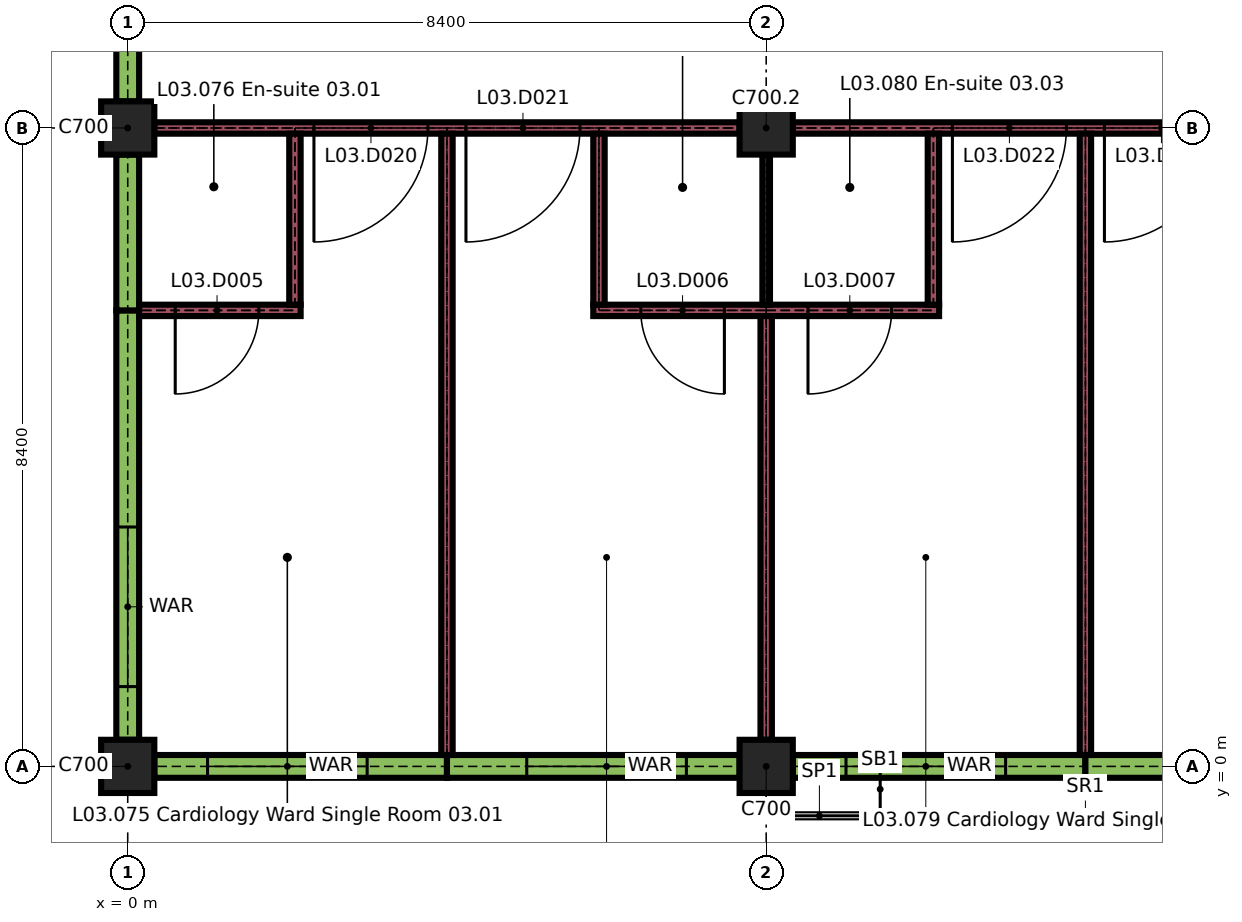
"""IFC4 building model, lengths in metres.
Left out: names, types, materials, properties, quantities, classifications, styles, units other than length and angle.
Written with IfcOpenShell. Run it as: python <this file> out.ifc"""

import sys

from ifc_helpers import new_model, si_unit, direction, frame, frame_2d, origin, origin_2d, place, context, subcontext, project, spatial, rectangle, extrude, element, fill, save


model = new_model("IFC4")
c1 = context("Model", 3, precision=1e-05, world=origin(), true_north=direction((0.0, 1.0)))
c2 = subcontext(c1, "Body", "Model", "MODEL_VIEW")
j1 = project(units=[si_unit("LENGTHUNIT", "METRE"), si_unit("PLANEANGLEUNIT", "RADIAN")], contexts=[c1])
p1 = place(None, origin())
s1 = spatial("IfcSite", under=j1, at=p1, CompositionType="ELEMENT")
p2 = place(p1, origin())
s2 = spatial("IfcBuilding", under=s1, at=p2, CompositionType="ELEMENT")
p3 = place(p2, frame((0.0, 0.0, 15.3)))
s3 = spatial("IfcBuildingStorey", under=s2, at=p3, CompositionType="ELEMENT", Elevation=15.3)
for number, where, z_axis, x_axis in (
    (1, (0.0, 0.0, 0.0), (0.0, 0.0, 1.0), (1.0, 0.0, 0.0)),
    (2, (8.4, 0.0, 0.0), (0.0, 0.0, 1.0), (1.0, 0.0, 0.0)),
    (3, (0.0, 8.4, 0.0), (0.0, 0.0, 1.0), (1.0, 0.0, 0.0)),
    (4, (8.4, 8.4, 0.0), (0.0, 0.0, 1.0), (1.0, 0.0, 0.0)),
):
    element("IfcColumn", number, at=place(p3, frame(where, z_axis=z_axis, x_axis=x_axis)), inside=s3, PredefinedType="COLUMN", context=c2, shape_type="SweptSolid", body=[
        extrude(rectangle(XDim=0.7, YDim=0.7, at=origin_2d()), origin(), (0.0, 0.0, 1.0), 3.26),
    ])
p4 = place(p3, frame((0.35, 0.0, 0.0), z_axis=(0.0, 0.0, 1.0), x_axis=(1.0, 0.0, 0.0)))
e5 = element("IfcWall", 5, at=p4, inside=s3, PredefinedType="SOLIDWALL", context=c2, shape_type="SweptSolid", body=[
    extrude(rectangle(XDim=3.85, YDim=0.3, at=frame_2d((1.925, 0.0))), origin(), (0.0, 0.0, 1.0), 2.96),
])
p5 = place(p4, frame((0.7, 0.0, 0.9)))
e6 = element("IfcOpeningElement", 6, at=p5, cuts=e5, PredefinedType="OPENING", context=c2, shape_type="SweptSolid", body=[
    extrude(rectangle(XDim=2.1, YDim=1.5, at=frame_2d((1.05, 0.75))), frame((0.0, 0.16, 0.0), z_axis=(0.0, -1.0, 0.0), x_axis=(1.0, 0.0, 0.0)), (0.0, 0.0, 1.0), 0.32),
])
p6 = place(p3, frame((4.2, 0.0, 0.0), z_axis=(0.0, 0.0, 1.0), x_axis=(1.0, 0.0, 0.0)))
e7 = element("IfcWall", 7, at=p6, inside=s3, PredefinedType="SOLIDWALL", context=c2, shape_type="SweptSolid", body=[
    extrude(rectangle(XDim=3.85, YDim=0.3, at=frame_2d((1.925, 0.0))), origin(), (0.0, 0.0, 1.0), 2.96),
])
p7 = place(p6, frame((1.05, 0.0, 0.9)))
e8 = element("IfcOpeningElement", 8, at=p7, cuts=e7, PredefinedType="OPENING", context=c2, shape_type="SweptSolid", body=[
    extrude(rectangle(XDim=2.1, YDim=1.5, at=frame_2d((1.05, 0.75))), frame((0.0, 0.16, 0.0), z_axis=(0.0, -1.0, 0.0), x_axis=(1.0, 0.0, 0.0)), (0.0, 0.0, 1.0), 0.32),
])
p8 = place(p3, frame((8.75, 0.0, 0.0), z_axis=(0.0, 0.0, 1.0), x_axis=(1.0, 0.0, 0.0)))
e9 = element("IfcWall", 9, at=p8, inside=s3, PredefinedType="SOLIDWALL", context=c2, shape_type="SweptSolid", body=[
    extrude(rectangle(XDim=3.85, YDim=0.3, at=frame_2d((1.925, 0.0))), origin(), (0.0, 0.0, 1.0), 2.96),
])
p9 = place(p8, frame((0.7, 0.0, 0.9)))
e10 = element("IfcOpeningElement", 10, at=p9, cuts=e9, PredefinedType="OPENING", context=c2, shape_type="SweptSolid", body=[
    extrude(rectangle(XDim=2.1, YDim=1.5, at=frame_2d((1.05, 0.75))), frame((0.0, 0.16, 0.0), z_axis=(0.0, -1.0, 0.0), x_axis=(1.0, 0.0, 0.0)), (0.0, 0.0, 1.0), 0.32),
])
p10 = place(p3, frame((12.6, 0.0, 0.0), z_axis=(0.0, 0.0, 1.0), x_axis=(1.0, 0.0, 0.0)))
e11 = element("IfcWall", 11, at=p10, inside=s3, PredefinedType="SOLIDWALL", context=c2, shape_type="SweptSolid", body=[
    extrude(rectangle(XDim=3.85, YDim=0.3, at=frame_2d((1.925, 0.0))), origin(), (0.0, 0.0, 1.0), 2.96),
])
p11 = place(p10, frame((1.05, 0.0, 0.9)))
e12 = element("IfcOpeningElement", 12, at=p11, cuts=e11, PredefinedType="OPENING", context=c2, shape_type="SweptSolid", body=[
    extrude(rectangle(XDim=2.1, YDim=1.5, at=frame_2d((1.05, 0.75))), frame((0.0, 0.16, 0.0), z_axis=(0.0, -1.0, 0.0), x_axis=(1.0, 0.0, 0.0)), (0.0, 0.0, 1.0), 0.32),
])
p12 = place(p3, frame((0.0, 0.35, 0.0), z_axis=(0.0, 0.0, 1.0), x_axis=(0.0, 1.0, 0.0)))
e13 = element("IfcWall", 13, at=p12, inside=s3, PredefinedType="SOLIDWALL", context=c2, shape_type="SweptSolid", body=[
    extrude(rectangle(XDim=5.65, YDim=0.3, at=frame_2d((2.825, 0.0))), origin(), (0.0, 0.0, 1.0), 2.96),
])
p13 = place(p12, frame((0.7, 0.0, 0.9)))
e14 = element("IfcOpeningElement", 14, at=p13, cuts=e13, PredefinedType="OPENING", context=c2, shape_type="SweptSolid", body=[
    extrude(rectangle(XDim=2.1, YDim=1.5, at=frame_2d((1.05, 0.75))), frame((0.0, 0.16, 0.0), z_axis=(0.0, -1.0, 0.0), x_axis=(1.0, 0.0, 0.0)), (0.0, 0.0, 1.0), 0.32),
])
p14 = place(p3, frame((0.0, 6.0, 0.0), z_axis=(0.0, 0.0, 1.0), x_axis=(0.0, 1.0, 0.0)))
e15 = element("IfcWall", 15, at=p14, inside=s3, PredefinedType="SOLIDWALL", context=c2, shape_type="SweptSolid", body=[
    extrude(rectangle(XDim=2.05, YDim=0.3, at=frame_2d((1.025, 0.0))), origin(), (0.0, 0.0, 1.0), 2.96),
])
p15 = place(p3, frame((0.0, 8.75, 0.0), z_axis=(0.0, 0.0, 1.0), x_axis=(0.0, 1.0, 0.0)))
e16 = element("IfcWall", 16, at=p15, inside=s3, PredefinedType="SOLIDWALL", context=c2, shape_type="SweptSolid", body=[
    extrude(rectangle(XDim=2.65, YDim=0.3, at=frame_2d((1.325, 0.0))), origin(), (0.0, 0.0, 1.0), 2.96),
])
p16 = place(p15, frame((1.3, 0.0, 0.9)))
e17 = element("IfcOpeningElement", 17, at=p16, cuts=e16, PredefinedType="OPENING", context=c2, shape_type="SweptSolid", body=[
    extrude(rectangle(XDim=0.9, YDim=1.5, at=frame_2d((0.45, 0.75))), frame((0.0, 0.16, 0.0), z_axis=(0.0, -1.0, 0.0), x_axis=(1.0, 0.0, 0.0)), (0.0, 0.0, 1.0), 0.32),
])
p17 = place(p3, frame((0.15, 6.0, 0.0), z_axis=(0.0, 0.0, 1.0), x_axis=(1.0, 0.0, 0.0)))
e18 = element("IfcWall", 18, at=p17, inside=s3, PredefinedType="PARTITIONING", context=c2, shape_type="SweptSolid", body=[
    extrude(rectangle(XDim=2.125, YDim=0.15, at=frame_2d((1.062, 0.0))), origin(), (0.0, 0.0, 1.0), 3.26),
])
p18 = place(p17, frame((0.475, 0.0, 0.0)))
e19 = element("IfcOpeningElement", 19, at=p18, cuts=e18, PredefinedType="OPENING", context=c2, shape_type="SweptSolid", body=[
    extrude(rectangle(XDim=1.1, YDim=2.1, at=frame_2d((0.55, 1.05))), frame((0.0, 0.085, 0.0), z_axis=(0.0, -1.0, 0.0), x_axis=(1.0, 0.0, 0.0)), (0.0, 0.0, 1.0), 0.17),
])
p19 = place(p3, frame((6.125, 6.0, 0.0), z_axis=(0.0, 0.0, 1.0), x_axis=(1.0, 0.0, 0.0)))
e20 = element("IfcWall", 20, at=p19, inside=s3, PredefinedType="PARTITIONING", context=c2, shape_type="SweptSolid", body=[
    extrude(rectangle(XDim=4.55, YDim=0.15, at=frame_2d((2.275, 0.0))), origin(), (0.0, 0.0, 1.0), 3.26),
])
p20 = place(p19, frame((0.625, 0.0, 0.0)))
e21 = element("IfcOpeningElement", 21, at=p20, cuts=e20, PredefinedType="OPENING", context=c2, shape_type="SweptSolid", body=[
    extrude(rectangle(XDim=1.1, YDim=2.1, at=frame_2d((0.55, 1.05))), frame((0.0, 0.085, 0.0), z_axis=(0.0, -1.0, 0.0), x_axis=(1.0, 0.0, 0.0)), (0.0, 0.0, 1.0), 0.17),
])
p21 = place(p19, frame((2.825, 0.0, 0.0)))
e22 = element("IfcOpeningElement", 22, at=p21, cuts=e20, PredefinedType="OPENING", context=c2, shape_type="SweptSolid", body=[
    extrude(rectangle(XDim=1.1, YDim=2.1, at=frame_2d((0.55, 1.05))), frame((0.0, 0.085, 0.0), z_axis=(0.0, -1.0, 0.0), x_axis=(1.0, 0.0, 0.0)), (0.0, 0.0, 1.0), 0.17),
])
p22 = place(p3, frame((0.35, 8.4, 0.0), z_axis=(0.0, 0.0, 1.0), x_axis=(1.0, 0.0, 0.0)))
e23 = element("IfcWall", 23, at=p22, inside=s3, PredefinedType="PARTITIONING", context=c2, shape_type="SweptSolid", body=[
    extrude(rectangle(XDim=7.7, YDim=0.15, at=frame_2d((3.85, 0.0))), origin(), (0.0, 0.0, 1.0), 3.26),
])
p23 = place(p22, frame((2.1, 0.0, 0.0)))
e24 = element("IfcOpeningElement", 24, at=p23, cuts=e23, PredefinedType="OPENING", context=c2, shape_type="SweptSolid", body=[
    extrude(rectangle(XDim=1.5, YDim=2.4, at=frame_2d((0.75, 1.2))), frame((0.0, 0.085, 0.0), z_axis=(0.0, -1.0, 0.0), x_axis=(1.0, 0.0, 0.0)), (0.0, 0.0, 1.0), 0.17),
])
p24 = place(p22, frame((4.1, 0.0, 0.0)))
e25 = element("IfcOpeningElement", 25, at=p24, cuts=e23, PredefinedType="OPENING", context=c2, shape_type="SweptSolid", body=[
    extrude(rectangle(XDim=1.5, YDim=2.4, at=frame_2d((0.75, 1.2))), frame((0.0, 0.085, 0.0), z_axis=(0.0, -1.0, 0.0), x_axis=(1.0, 0.0, 0.0)), (0.0, 0.0, 1.0), 0.17),
])
p25 = place(p3, frame((8.75, 8.4, 0.0), z_axis=(0.0, 0.0, 1.0), x_axis=(1.0, 0.0, 0.0)))
e26 = element("IfcWall", 26, at=p25, inside=s3, PredefinedType="PARTITIONING", context=c2, shape_type="SweptSolid", body=[
    extrude(rectangle(XDim=7.7, YDim=0.15, at=frame_2d((3.85, 0.0))), origin(), (0.0, 0.0, 1.0), 3.26),
])
p26 = place(p25, frame((2.1, 0.0, 0.0)))
e27 = element("IfcOpeningElement", 27, at=p26, cuts=e26, PredefinedType="OPENING", context=c2, shape_type="SweptSolid", body=[
    extrude(rectangle(XDim=1.5, YDim=2.4, at=frame_2d((0.75, 1.2))), frame((0.0, 0.085, 0.0), z_axis=(0.0, -1.0, 0.0), x_axis=(1.0, 0.0, 0.0)), (0.0, 0.0, 1.0), 0.17),
])
p27 = place(p25, frame((4.1, 0.0, 0.0)))
e28 = element("IfcOpeningElement", 28, at=p27, cuts=e26, PredefinedType="OPENING", context=c2, shape_type="SweptSolid", body=[
    extrude(rectangle(XDim=1.5, YDim=2.4, at=frame_2d((0.75, 1.2))), frame((0.0, 0.085, 0.0), z_axis=(0.0, -1.0, 0.0), x_axis=(1.0, 0.0, 0.0)), (0.0, 0.0, 1.0), 0.17),
])
p28 = place(p3, frame((2.2, 6.075, 0.0), z_axis=(0.0, 0.0, 1.0), x_axis=(0.0, 1.0, 0.0)))
e29 = element("IfcWall", 29, at=p28, inside=s3, PredefinedType="PARTITIONING", context=c2, shape_type="SweptSolid", body=[
    extrude(rectangle(XDim=2.25, YDim=0.15, at=frame_2d((1.125, 0.0))), origin(), (0.0, 0.0, 1.0), 3.26),
])
p29 = place(p3, frame((4.2, 0.15, 0.0), z_axis=(0.0, 0.0, 1.0), x_axis=(0.0, 1.0, 0.0)))
e30 = element("IfcWall", 30, at=p29, inside=s3, PredefinedType="PARTITIONING", context=c2, shape_type="SweptSolid", body=[
    extrude(rectangle(XDim=8.175, YDim=0.15, at=frame_2d((4.087, 0.0))), origin(), (0.0, 0.0, 1.0), 3.26),
])
p30 = place(p3, frame((6.2, 6.075, 0.0), z_axis=(0.0, 0.0, 1.0), x_axis=(0.0, 1.0, 0.0)))
e31 = element("IfcWall", 31, at=p30, inside=s3, PredefinedType="PARTITIONING", context=c2, shape_type="SweptSolid", body=[
    extrude(rectangle(XDim=2.25, YDim=0.15, at=frame_2d((1.125, 0.0))), origin(), (0.0, 0.0, 1.0), 3.26),
])
p31 = place(p3, frame((8.4, 0.35, 0.0), z_axis=(0.0, 0.0, 1.0), x_axis=(0.0, 1.0, 0.0)))
e32 = element("IfcWall", 32, at=p31, inside=s3, PredefinedType="PARTITIONING", context=c2, shape_type="SweptSolid", body=[
    extrude(rectangle(XDim=5.575, YDim=0.15, at=frame_2d((2.788, 0.0))), origin(), (0.0, 0.0, 1.0), 3.26),
])
p32 = place(p3, frame((8.4, 6.075, 0.0), z_axis=(0.0, 0.0, 1.0), x_axis=(0.0, 1.0, 0.0)))
e33 = element("IfcWall", 33, at=p32, inside=s3, PredefinedType="PARTITIONING", context=c2, shape_type="SweptSolid", body=[
    extrude(rectangle(XDim=1.975, YDim=0.1, at=frame_2d((0.988, 0.0))), origin(), (0.0, 0.0, 1.0), 3.26),
])
p33 = place(p3, frame((10.6, 6.075, 0.0), z_axis=(0.0, 0.0, 1.0), x_axis=(0.0, 1.0, 0.0)))
e34 = element("IfcWall", 34, at=p33, inside=s3, PredefinedType="PARTITIONING", context=c2, shape_type="SweptSolid", body=[
    extrude(rectangle(XDim=2.25, YDim=0.15, at=frame_2d((1.125, 0.0))), origin(), (0.0, 0.0, 1.0), 3.26),
])
p34 = place(p3, frame((12.6, 0.15, 0.0), z_axis=(0.0, 0.0, 1.0), x_axis=(0.0, 1.0, 0.0)))
e35 = element("IfcWall", 35, at=p34, inside=s3, PredefinedType="PARTITIONING", context=c2, shape_type="SweptSolid", body=[
    extrude(rectangle(XDim=8.175, YDim=0.15, at=frame_2d((4.087, 0.0))), origin(), (0.0, 0.0, 1.0), 3.26),
])
p35 = place(p5, origin())
e36 = element("IfcWindow", 36, at=p35, inside=s3, PartitioningType="DOUBLE_PANEL_VERTICAL", PredefinedType="WINDOW", context=c2, shape_type="SweptSolid", body=[
    extrude(rectangle(XDim=2.1, YDim=1.5, at=frame_2d((1.05, 0.75))), frame((0.0, 0.05, 0.0), z_axis=(0.0, -1.0, 0.0), x_axis=(1.0, 0.0, 0.0)), (0.0, 0.0, 1.0), 0.1),
])
fill(e6, e36)
p36 = place(p7, origin())
e37 = element("IfcWindow", 37, at=p36, inside=s3, PartitioningType="DOUBLE_PANEL_VERTICAL", PredefinedType="WINDOW", context=c2, shape_type="SweptSolid", body=[
    extrude(rectangle(XDim=2.1, YDim=1.5, at=frame_2d((1.05, 0.75))), frame((0.0, 0.05, 0.0), z_axis=(0.0, -1.0, 0.0), x_axis=(1.0, 0.0, 0.0)), (0.0, 0.0, 1.0), 0.1),
])
fill(e8, e37)
p37 = place(p9, origin())
e38 = element("IfcWindow", 38, at=p37, inside=s3, PartitioningType="DOUBLE_PANEL_VERTICAL", PredefinedType="WINDOW", context=c2, shape_type="SweptSolid", body=[
    extrude(rectangle(XDim=2.1, YDim=1.5, at=frame_2d((1.05, 0.75))), frame((0.0, 0.05, 0.0), z_axis=(0.0, -1.0, 0.0), x_axis=(1.0, 0.0, 0.0)), (0.0, 0.0, 1.0), 0.1),
])
fill(e10, e38)
p38 = place(p13, origin())
e39 = element("IfcWindow", 39, at=p38, inside=s3, PartitioningType="DOUBLE_PANEL_VERTICAL", PredefinedType="WINDOW", context=c2, shape_type="SweptSolid", body=[
    extrude(rectangle(XDim=2.1, YDim=1.5, at=frame_2d((1.05, 0.75))), frame((0.0, 0.05, 0.0), z_axis=(0.0, -1.0, 0.0), x_axis=(1.0, 0.0, 0.0)), (0.0, 0.0, 1.0), 0.1),
])
fill(e14, e39)
p39 = place(p18, origin())
e40 = element("IfcDoor", 40, at=p39, inside=s3, OperationType="SINGLE_SWING_LEFT", PredefinedType="DOOR", context=c2, shape_type="SweptSolid", body=[
    extrude(rectangle(XDim=1.1, YDim=2.1, at=frame_2d((0.55, 1.05))), frame((0.0, 0.025, 0.0), z_axis=(0.0, -1.0, 0.0), x_axis=(1.0, 0.0, 0.0)), (0.0, 0.0, 1.0), 0.05),
])
fill(e19, e40)
p40 = place(p20, origin())
e41 = element("IfcDoor", 41, at=p40, inside=s3, OperationType="SINGLE_SWING_RIGHT", PredefinedType="DOOR", context=c2, shape_type="SweptSolid", body=[
    extrude(rectangle(XDim=1.1, YDim=2.1, at=frame_2d((0.55, 1.05))), frame((0.0, 0.025, 0.0), z_axis=(0.0, -1.0, 0.0), x_axis=(1.0, 0.0, 0.0)), (0.0, 0.0, 1.0), 0.05),
])
fill(e21, e41)
p41 = place(p21, origin())
e42 = element("IfcDoor", 42, at=p41, inside=s3, OperationType="SINGLE_SWING_LEFT", PredefinedType="DOOR", context=c2, shape_type="SweptSolid", body=[
    extrude(rectangle(XDim=1.1, YDim=2.1, at=frame_2d((0.55, 1.05))), frame((0.0, 0.025, 0.0), z_axis=(0.0, -1.0, 0.0), x_axis=(1.0, 0.0, 0.0)), (0.0, 0.0, 1.0), 0.05),
])
fill(e22, e42)
p42 = place(p23, origin())
e43 = element("IfcDoor", 43, at=p42, inside=s3, OperationType="SINGLE_SWING_LEFT", PredefinedType="DOOR", context=c2, shape_type="SweptSolid", body=[
    extrude(rectangle(XDim=1.5, YDim=2.4, at=frame_2d((0.75, 1.2))), frame((0.0, 0.03, 0.0), z_axis=(0.0, -1.0, 0.0), x_axis=(1.0, 0.0, 0.0)), (0.0, 0.0, 1.0), 0.06),
])
fill(e24, e43)
p43 = place(p24, origin())
e44 = element("IfcDoor", 44, at=p43, inside=s3, OperationType="SINGLE_SWING_LEFT", PredefinedType="DOOR", context=c2, shape_type="SweptSolid", body=[
    extrude(rectangle(XDim=1.5, YDim=2.4, at=frame_2d((0.75, 1.2))), frame((0.0, 0.03, 0.0), z_axis=(0.0, -1.0, 0.0), x_axis=(1.0, 0.0, 0.0)), (0.0, 0.0, 1.0), 0.06),
])
fill(e25, e44)
p44 = place(p26, origin())
e45 = element("IfcDoor", 45, at=p44, inside=s3, OperationType="SINGLE_SWING_LEFT", PredefinedType="DOOR", context=c2, shape_type="SweptSolid", body=[
    extrude(rectangle(XDim=1.5, YDim=2.4, at=frame_2d((0.75, 1.2))), frame((0.0, 0.03, 0.0), z_axis=(0.0, -1.0, 0.0), x_axis=(1.0, 0.0, 0.0)), (0.0, 0.0, 1.0), 0.06),
])
fill(e27, e45)
p45 = place(p27, origin())
e46 = element("IfcDoor", 46, at=p45, inside=s3, OperationType="SINGLE_SWING_LEFT", PredefinedType="DOOR", context=c2, shape_type="SweptSolid", body=[
    extrude(rectangle(XDim=1.5, YDim=2.4, at=frame_2d((0.75, 1.2))), frame((0.0, 0.03, 0.0), z_axis=(0.0, -1.0, 0.0), x_axis=(1.0, 0.0, 0.0)), (0.0, 0.0, 1.0), 0.06),
])
fill(e28, e46)
save(model, sys.argv[1])
